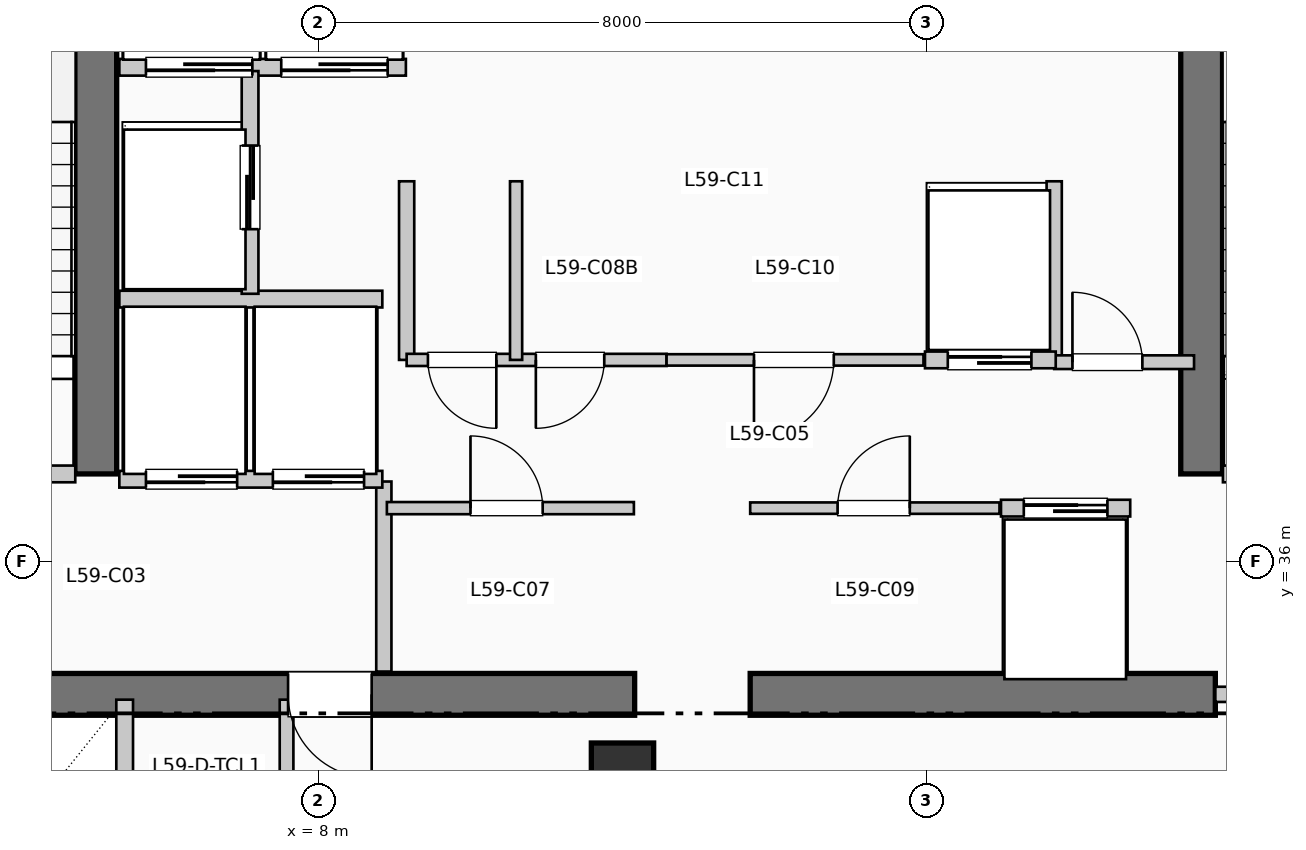
"""IFC4 building model, lengths in metres.
Left out: names, types, materials, properties, quantities, classifications, styles, units other than length and angle.
Written with IfcOpenShell. Run it as: python <this file> out.ifc"""

import sys

from ifc_helpers import new_model, si_unit, direction, frame, frame_2d, origin, origin_2d, place, context, subcontext, project, spatial, rectangle, extrude, element, fill, save


model = new_model("IFC4")
c1 = context("Model", 3, precision=1e-05, world=origin(), true_north=direction((0.0, 1.0)))
c2 = subcontext(c1, "Body", "Model", "MODEL_VIEW")
j1 = project(units=[si_unit("LENGTHUNIT", "METRE"), si_unit("PLANEANGLEUNIT", "RADIAN")], contexts=[c1])
p1 = place(None, origin())
s1 = spatial("IfcSite", under=j1, at=p1, CompositionType="ELEMENT")
p2 = place(p1, origin())
s2 = spatial("IfcBuilding", under=s1, at=p2, CompositionType="ELEMENT")
p3 = place(p2, frame((0.0, 0.0, 243.54)))
s3 = spatial("IfcBuildingStorey", under=s2, at=p3, CompositionType="ELEMENT", Elevation=243.54)
p4 = place(p3, frame((1.45, 34.25, 0.0), z_axis=(0.0, 0.0, 1.0), x_axis=(1.0, 0.0, 0.0)))
e1 = element("IfcWall", 1, at=p4, inside=s3, PredefinedType="SHEAR", context=c2, shape_type="SweptSolid", body=[
    extrude(rectangle(XDim=10.71, YDim=0.55, at=frame_2d((5.355, 0.0))), origin(), (0.0, 0.0, 1.0), 3.96),
])
p5 = place(p4, frame((7.25, 0.0, 0.0), z_axis=(0.0, 0.0, 1.0), x_axis=(-1.0, 0.0, 0.0)))
e2 = element("IfcOpeningElement", 2, at=p5, cuts=e1, PredefinedType="OPENING", context=c2, shape_type="SweptSolid", body=[
    extrude(rectangle(XDim=1.1, YDim=2.15, at=frame_2d((0.55, 1.075))), frame((0.0, 0.285, 0.0), z_axis=(0.0, -1.0, 0.0), x_axis=(1.0, 0.0, 0.0)), (0.0, 0.0, 1.0), 0.57),
])
p6 = place(p3, frame((13.68, 34.25, 0.0), z_axis=(0.0, 0.0, 1.0), x_axis=(1.0, 0.0, 0.0)))
e3 = element("IfcWall", 3, at=p6, inside=s3, PredefinedType="SHEAR", context=c2, shape_type="SweptSolid", body=[
    extrude(rectangle(XDim=6.12, YDim=0.55, at=frame_2d((3.06, 0.0))), origin(), (0.0, 0.0, 1.0), 3.96),
])
for number, where, z_axis, x_axis in (
    (4, (5.07, 37.15, 0.0), (0.0, 0.0, 1.0), (0.0, 1.0, 0.0)),
    (5, (19.62, 37.15, 0.0), (0.0, 0.0, 1.0), (0.0, 1.0, 0.0)),
):
    element("IfcWall", number, at=place(p3, frame(where, z_axis=z_axis, x_axis=x_axis)), inside=s3, PredefinedType="SHEAR", context=c2, shape_type="SweptSolid", body=[
        extrude(rectangle(XDim=7.89, YDim=0.55, at=frame_2d((3.945, 0.0))), origin(), (0.0, 0.0, 1.0), 3.96),
    ])
p7 = place(p3, frame((12.0, 33.2, 0.0), z_axis=(0.0, 0.0, 1.0), x_axis=(1.0, 0.0, 0.0)))
e6 = element("IfcColumn", 6, at=p7, inside=s3, PredefinedType="COLUMN", context=c2, shape_type="SweptSolid", body=[
    extrude(rectangle(XDim=0.82, YDim=0.82, at=origin_2d()), origin(), (0.0, 0.0, 1.0), 3.96),
])
p8 = place(p3, frame((1.65, 37.15, 0.0), z_axis=(0.0, 0.0, 1.0), x_axis=(1.0, 0.0, 0.0)))
e7 = element("IfcWall", 7, at=p8, inside=s3, PredefinedType="PARTITIONING", context=c2, shape_type="SweptSolid", body=[
    extrude(rectangle(XDim=3.15, YDim=0.22, at=frame_2d((1.575, 0.0))), origin(), (0.0, 0.0, 1.0), 3.71),
])
p9 = place(p8, frame((2.05, 0.0, 0.0), z_axis=(0.0, 0.0, 1.0), x_axis=(-1.0, 0.0, 0.0)))
e8 = element("IfcOpeningElement", 8, at=p9, cuts=e7, PredefinedType="OPENING", context=c2, shape_type="SweptSolid", body=[
    extrude(rectangle(XDim=1.05, YDim=2.15, at=frame_2d((0.525, 1.075))), frame((0.0, 0.12, 0.0), z_axis=(0.0, -1.0, 0.0), x_axis=(1.0, 0.0, 0.0)), (0.0, 0.0, 1.0), 0.24),
])
p10 = place(p3, frame((8.86, 34.55, 0.0), z_axis=(0.0, 0.0, 1.0), x_axis=(0.0, 1.0, 0.0)))
e9 = element("IfcWall", 9, at=p10, inside=s3, PredefinedType="PARTITIONING", context=c2, shape_type="SweptSolid", body=[
    extrude(rectangle(XDim=2.5, YDim=0.2, at=frame_2d((1.25, 0.0))), origin(), (0.0, 0.0, 1.0), 3.71),
])
p11 = place(p3, frame((19.9, 37.15, 0.0), z_axis=(0.0, 0.0, 1.0), x_axis=(1.0, 0.0, 0.0)))
e10 = element("IfcWall", 10, at=p11, inside=s3, PredefinedType="PARTITIONING", context=c2, shape_type="SweptSolid", body=[
    extrude(rectangle(XDim=3.15, YDim=0.22, at=frame_2d((1.575, 0.0))), origin(), (0.0, 0.0, 1.0), 3.71),
])
p12 = place(p11, frame((2.05, 0.0, 0.0), z_axis=(0.0, 0.0, 1.0), x_axis=(-1.0, 0.0, 0.0)))
e11 = element("IfcOpeningElement", 11, at=p12, cuts=e10, PredefinedType="OPENING", context=c2, shape_type="SweptSolid", body=[
    extrude(rectangle(XDim=1.05, YDim=2.15, at=frame_2d((0.525, 1.075))), frame((0.0, 0.12, 0.0), z_axis=(0.0, -1.0, 0.0), x_axis=(1.0, 0.0, 0.0)), (0.0, 0.0, 1.0), 0.24),
])
p13 = place(p3, frame((19.8, 34.25, 0.0), z_axis=(0.0, 0.0, 1.0), x_axis=(1.0, 0.0, 0.0)))
e12 = element("IfcWall", 12, at=p13, inside=s3, PredefinedType="PARTITIONING", context=c2, shape_type="SweptSolid", body=[
    extrude(rectangle(XDim=3.25, YDim=0.2, at=frame_2d((1.625, 0.0))), origin(), (0.0, 0.0, 1.0), 3.71),
])
p14 = place(p13, frame((2.15, 0.0, 0.0), z_axis=(0.0, 0.0, 1.0), x_axis=(-1.0, 0.0, 0.0)))
e13 = element("IfcOpeningElement", 13, at=p14, cuts=e12, PredefinedType="OPENING", context=c2, shape_type="SweptSolid", body=[
    extrude(rectangle(XDim=1.1, YDim=2.15, at=frame_2d((0.55, 1.075))), frame((0.0, 0.11, 0.0), z_axis=(0.0, -1.0, 0.0), x_axis=(1.0, 0.0, 0.0)), (0.0, 0.0, 1.0), 0.22),
])
p15 = place(p3, frame((5.38, 37.08, 0.0), z_axis=(0.0, 0.0, 1.0), x_axis=(1.0, 0.0, 0.0)))
e14 = element("IfcWall", 14, at=p15, inside=s3, PredefinedType="PARTITIONING", context=c2, shape_type="SweptSolid", body=[
    extrude(rectangle(XDim=3.46, YDim=0.22, at=frame_2d((1.73, 0.0))), origin(), (0.0, 0.0, 1.0), 3.71),
])
p16 = place(p15, frame((1.55, 0.0, 0.0), z_axis=(0.0, 0.0, 1.0), x_axis=(-1.0, 0.0, 0.0)))
e15 = element("IfcOpeningElement", 15, at=p16, cuts=e14, PredefinedType="OPENING", context=c2, shape_type="SweptSolid", body=[
    extrude(rectangle(XDim=1.2, YDim=2.2, at=frame_2d((0.6, 1.1))), frame((0.0, 0.12, 0.0), z_axis=(0.0, -1.0, 0.0), x_axis=(1.0, 0.0, 0.0)), (0.0, 0.0, 1.0), 0.24),
])
p17 = place(p15, frame((3.22, 0.0, 0.0), z_axis=(0.0, 0.0, 1.0), x_axis=(-1.0, 0.0, 0.0)))
e16 = element("IfcOpeningElement", 16, at=p17, cuts=e14, PredefinedType="OPENING", context=c2, shape_type="SweptSolid", body=[
    extrude(rectangle(XDim=1.2, YDim=2.2, at=frame_2d((0.6, 1.1))), frame((0.0, 0.12, 0.0), z_axis=(0.0, -1.0, 0.0), x_axis=(1.0, 0.0, 0.0)), (0.0, 0.0, 1.0), 0.24),
])
p18 = place(p3, frame((5.38, 39.45, 0.0), z_axis=(0.0, 0.0, 1.0), x_axis=(1.0, 0.0, 0.0)))
e17 = element("IfcWall", 17, at=p18, inside=s3, PredefinedType="PARTITIONING", context=c2, shape_type="SweptSolid", body=[
    extrude(rectangle(XDim=3.46, YDim=0.22, at=frame_2d((1.73, 0.0))), origin(), (0.0, 0.0, 1.0), 3.71),
])
p19 = place(p3, frame((5.38, 42.5, 0.0), z_axis=(0.0, 0.0, 1.0), x_axis=(1.0, 0.0, 0.0)))
e18 = element("IfcWall", 18, at=p19, inside=s3, PredefinedType="PARTITIONING", context=c2, shape_type="SweptSolid", body=[
    extrude(rectangle(XDim=3.77, YDim=0.22, at=frame_2d((1.885, 0.0))), origin(), (0.0, 0.0, 1.0), 3.71),
])
p20 = place(p19, frame((1.75, 0.0, 0.0), z_axis=(0.0, 0.0, 1.0), x_axis=(-1.0, 0.0, 0.0)))
e19 = element("IfcOpeningElement", 19, at=p20, cuts=e18, PredefinedType="OPENING", context=c2, shape_type="SweptSolid", body=[
    extrude(rectangle(XDim=1.4, YDim=2.2, at=frame_2d((0.7, 1.1))), frame((0.0, 0.12, 0.0), z_axis=(0.0, -1.0, 0.0), x_axis=(1.0, 0.0, 0.0)), (0.0, 0.0, 1.0), 0.24),
])
p21 = place(p19, frame((3.53, 0.0, 0.0), z_axis=(0.0, 0.0, 1.0), x_axis=(-1.0, 0.0, 0.0)))
e20 = element("IfcOpeningElement", 20, at=p21, cuts=e18, PredefinedType="OPENING", context=c2, shape_type="SweptSolid", body=[
    extrude(rectangle(XDim=1.4, YDim=2.2, at=frame_2d((0.7, 1.1))), frame((0.0, 0.12, 0.0), z_axis=(0.0, -1.0, 0.0), x_axis=(1.0, 0.0, 0.0)), (0.0, 0.0, 1.0), 0.24),
])
p22 = place(p3, frame((7.1, 39.52, 0.0), z_axis=(0.0, 0.0, 1.0), x_axis=(0.0, 1.0, 0.0)))
e21 = element("IfcWall", 21, at=p22, inside=s3, PredefinedType="PARTITIONING", context=c2, shape_type="SweptSolid", body=[
    extrude(rectangle(XDim=2.93, YDim=0.22, at=frame_2d((1.465, 0.0))), origin(), (0.0, 0.0, 1.0), 3.71),
])
p23 = place(p22, frame((0.85, 0.0, 0.0)))
e22 = element("IfcOpeningElement", 22, at=p23, cuts=e21, PredefinedType="OPENING", context=c2, shape_type="SweptSolid", body=[
    extrude(rectangle(XDim=1.1, YDim=2.2, at=frame_2d((0.55, 1.1))), frame((0.0, 0.12, 0.0), z_axis=(0.0, -1.0, 0.0), x_axis=(1.0, 0.0, 0.0)), (0.0, 0.0, 1.0), 0.24),
])
p24 = place(p3, frame((5.45, 31.8, 0.0), z_axis=(0.0, 0.0, 1.0), x_axis=(0.0, 1.0, 0.0)))
e23 = element("IfcWall", 23, at=p24, inside=s3, PredefinedType="PARTITIONING", context=c2, shape_type="SweptSolid", body=[
    extrude(rectangle(XDim=2.38, YDim=0.22, at=frame_2d((1.19, 0.0))), origin(), (0.0, 0.0, 1.0), 3.71),
])
for number, where, z_axis, x_axis in (
    (24, (9.16, 38.65, 0.0), (0.0, 0.0, 1.0), (0.0, 1.0, 0.0)),
    (25, (17.68, 38.65, 0.0), (0.0, 0.0, 1.0), (0.0, 1.0, 0.0)),
):
    element("IfcWall", number, at=place(p3, frame(where, z_axis=z_axis, x_axis=x_axis)), inside=s3, PredefinedType="PARTITIONING", context=c2, shape_type="SweptSolid", body=[
        extrude(rectangle(XDim=2.35, YDim=0.2, at=frame_2d((1.175, 0.0))), origin(), (0.0, 0.0, 1.0), 3.71),
    ])
p25 = place(p3, frame((17.68, 38.62, 0.0), z_axis=(0.0, 0.0, 1.0), x_axis=(1.0, 0.0, 0.0)))
e26 = element("IfcWall", 26, at=p25, inside=s3, PredefinedType="PARTITIONING", context=c2, shape_type="SweptSolid", body=[
    extrude(rectangle(XDim=1.84, YDim=0.18, at=frame_2d((0.92, 0.0))), origin(), (0.0, 0.0, 1.0), 3.71),
])
p26 = place(p25, frame((0.24, 0.0, 0.0)))
e27 = element("IfcOpeningElement", 27, at=p26, cuts=e26, PredefinedType="OPENING", context=c2, shape_type="SweptSolid", body=[
    extrude(rectangle(XDim=0.92, YDim=2.1, at=frame_2d((0.46, 1.05))), frame((0.0, 0.1, 0.0), z_axis=(0.0, -1.0, 0.0), x_axis=(1.0, 0.0, 0.0)), (0.0, 0.0, 1.0), 0.2),
])
p27 = place(p3, frame((7.58, 31.82, 0.0), z_axis=(0.0, 0.0, 1.0), x_axis=(0.0, 1.0, 0.0)))
e28 = element("IfcWall", 28, at=p27, inside=s3, PredefinedType="PLUMBINGWALL", context=c2, shape_type="SweptSolid", body=[
    extrude(rectangle(XDim=2.36, YDim=0.18, at=frame_2d((1.18, 0.0))), origin(), (0.0, 0.0, 1.0), 3.71),
])
p28 = place(p3, frame((8.9, 36.7, 0.0), z_axis=(0.0, 0.0, 1.0), x_axis=(1.0, 0.0, 0.0)))
e29 = element("IfcWall", 29, at=p28, inside=s3, PredefinedType="PARTITIONING", context=c2, shape_type="SweptSolid", body=[
    extrude(rectangle(XDim=3.25, YDim=0.16, at=frame_2d((1.625, 0.0))), origin(), (0.0, 0.0, 1.0), 3.71),
])
p29 = place(p28, frame((1.1, 0.0, 0.0)))
e30 = element("IfcOpeningElement", 30, at=p29, cuts=e29, PredefinedType="OPENING", context=c2, shape_type="SweptSolid", body=[
    extrude(rectangle(XDim=0.95, YDim=2.15, at=frame_2d((0.475, 1.075))), frame((0.0, 0.09, 0.0), z_axis=(0.0, -1.0, 0.0), x_axis=(1.0, 0.0, 0.0)), (0.0, 0.0, 1.0), 0.18),
])
p30 = place(p3, frame((9.16, 38.65, 0.0), z_axis=(0.0, 0.0, 1.0), x_axis=(1.0, 0.0, 0.0)))
e31 = element("IfcWall", 31, at=p30, inside=s3, PredefinedType="PARTITIONING", context=c2, shape_type="SweptSolid", body=[
    extrude(rectangle(XDim=3.42, YDim=0.16, at=frame_2d((1.71, 0.0))), origin(), (0.0, 0.0, 1.0), 3.71),
])
p31 = place(p30, frame((1.18, 0.0, 0.0), z_axis=(0.0, 0.0, 1.0), x_axis=(-1.0, 0.0, 0.0)))
e32 = element("IfcOpeningElement", 32, at=p31, cuts=e31, PredefinedType="OPENING", context=c2, shape_type="SweptSolid", body=[
    extrude(rectangle(XDim=0.9, YDim=2.15, at=frame_2d((0.45, 1.075))), frame((0.0, 0.09, 0.0), z_axis=(0.0, -1.0, 0.0), x_axis=(1.0, 0.0, 0.0)), (0.0, 0.0, 1.0), 0.18),
])
p32 = place(p30, frame((2.6, 0.0, 0.0), z_axis=(0.0, 0.0, 1.0), x_axis=(-1.0, 0.0, 0.0)))
e33 = element("IfcOpeningElement", 33, at=p32, cuts=e31, PredefinedType="OPENING", context=c2, shape_type="SweptSolid", body=[
    extrude(rectangle(XDim=0.9, YDim=2.15, at=frame_2d((0.45, 1.075))), frame((0.0, 0.09, 0.0), z_axis=(0.0, -1.0, 0.0), x_axis=(1.0, 0.0, 0.0)), (0.0, 0.0, 1.0), 0.18),
])
p33 = place(p3, frame((10.6, 38.65, 0.0), z_axis=(0.0, 0.0, 1.0), x_axis=(0.0, 1.0, 0.0)))
e34 = element("IfcWall", 34, at=p33, inside=s3, PredefinedType="PARTITIONING", context=c2, shape_type="SweptSolid", body=[
    extrude(rectangle(XDim=2.35, YDim=0.16, at=frame_2d((1.175, 0.0))), origin(), (0.0, 0.0, 1.0), 3.71),
])
p34 = place(p3, frame((13.68, 36.7, 0.0), z_axis=(0.0, 0.0, 1.0), x_axis=(1.0, 0.0, 0.0)))
e35 = element("IfcWall", 35, at=p34, inside=s3, PredefinedType="PARTITIONING", context=c2, shape_type="SweptSolid", body=[
    extrude(rectangle(XDim=3.28, YDim=0.15, at=frame_2d((1.64, 0.0))), origin(), (0.0, 0.0, 1.0), 3.71),
])
p35 = place(p34, frame((1.15, 0.0, 0.0)))
e36 = element("IfcOpeningElement", 36, at=p35, cuts=e35, PredefinedType="OPENING", context=c2, shape_type="SweptSolid", body=[
    extrude(rectangle(XDim=0.95, YDim=2.15, at=frame_2d((0.475, 1.075))), frame((0.0, 0.085, 0.0), z_axis=(0.0, -1.0, 0.0), x_axis=(1.0, 0.0, 0.0)), (0.0, 0.0, 1.0), 0.17),
])
p36 = place(p3, frame((12.58, 38.65, 0.0), z_axis=(0.0, 0.0, 1.0), x_axis=(1.0, 0.0, 0.0)))
e37 = element("IfcWall", 37, at=p36, inside=s3, PredefinedType="PARTITIONING", context=c2, shape_type="SweptSolid", body=[
    extrude(rectangle(XDim=3.38, YDim=0.15, at=frame_2d((1.69, 0.0))), origin(), (0.0, 0.0, 1.0), 3.71),
])
p37 = place(p36, frame((2.2, 0.0, 0.0), z_axis=(0.0, 0.0, 1.0), x_axis=(-1.0, 0.0, 0.0)))
e38 = element("IfcOpeningElement", 38, at=p37, cuts=e37, PredefinedType="OPENING", context=c2, shape_type="SweptSolid", body=[
    extrude(rectangle(XDim=1.05, YDim=2.15, at=frame_2d((0.525, 1.075))), frame((0.0, 0.085, 0.0), z_axis=(0.0, -1.0, 0.0), x_axis=(1.0, 0.0, 0.0)), (0.0, 0.0, 1.0), 0.17),
])
p38 = place(p3, frame((16.98, 36.7, 0.0), z_axis=(0.0, 0.0, 1.0), x_axis=(1.0, 0.0, 0.0)))
e39 = element("IfcWall", 39, at=p38, inside=s3, PredefinedType="PARTITIONING", context=c2, shape_type="SweptSolid", body=[
    extrude(rectangle(XDim=1.7, YDim=0.22, at=frame_2d((0.85, 0.0))), origin(), (0.0, 0.0, 1.0), 3.71),
])
p39 = place(p38, frame((0.3, 0.0, 0.0)))
e40 = element("IfcOpeningElement", 40, at=p39, cuts=e39, PredefinedType="OPENING", context=c2, shape_type="SweptSolid", body=[
    extrude(rectangle(XDim=1.1, YDim=2.2, at=frame_2d((0.55, 1.1))), frame((0.0, 0.12, 0.0), z_axis=(0.0, -1.0, 0.0), x_axis=(1.0, 0.0, 0.0)), (0.0, 0.0, 1.0), 0.24),
])
p40 = place(p3, frame((15.98, 38.65, 0.0), z_axis=(0.0, 0.0, 1.0), x_axis=(1.0, 0.0, 0.0)))
e41 = element("IfcWall", 41, at=p40, inside=s3, PredefinedType="PARTITIONING", context=c2, shape_type="SweptSolid", body=[
    extrude(rectangle(XDim=1.72, YDim=0.22, at=frame_2d((0.86, 0.0))), origin(), (0.0, 0.0, 1.0), 3.71),
])
p41 = place(p40, frame((0.3, 0.0, 0.0)))
e42 = element("IfcOpeningElement", 42, at=p41, cuts=e41, PredefinedType="OPENING", context=c2, shape_type="SweptSolid", body=[
    extrude(rectangle(XDim=1.1, YDim=2.2, at=frame_2d((0.55, 1.1))), frame((0.0, 0.12, 0.0), z_axis=(0.0, -1.0, 0.0), x_axis=(1.0, 0.0, 0.0)), (0.0, 0.0, 1.0), 0.24),
])
p42 = place(p5, origin())
e43 = element("IfcDoor", 43, at=p42, inside=s3, OperationType="SINGLE_SWING_RIGHT", PredefinedType="DOOR", context=c2, shape_type="SweptSolid", body=[
    extrude(rectangle(XDim=1.1, YDim=2.15, at=frame_2d((0.55, 1.075))), frame((0.0, 0.025, 0.0), z_axis=(0.0, -1.0, 0.0), x_axis=(1.0, 0.0, 0.0)), (0.0, 0.0, 1.0), 0.05),
])
fill(e2, e43)
p43 = place(p16, origin())
e44 = element("IfcDoor", 44, at=p43, inside=s3, OperationType="SLIDING_TO_RIGHT", PredefinedType="DOOR", context=c2, shape_type="SweptSolid", body=[
    extrude(rectangle(XDim=1.2, YDim=2.2, at=frame_2d((0.6, 1.1))), frame((0.0, 0.025, 0.0), z_axis=(0.0, -1.0, 0.0), x_axis=(1.0, 0.0, 0.0)), (0.0, 0.0, 1.0), 0.05),
])
fill(e15, e44)
p44 = place(p17, origin())
e45 = element("IfcDoor", 45, at=p44, inside=s3, OperationType="SLIDING_TO_RIGHT", PredefinedType="DOOR", context=c2, shape_type="SweptSolid", body=[
    extrude(rectangle(XDim=1.2, YDim=2.2, at=frame_2d((0.6, 1.1))), frame((0.0, 0.025, 0.0), z_axis=(0.0, -1.0, 0.0), x_axis=(1.0, 0.0, 0.0)), (0.0, 0.0, 1.0), 0.05),
])
fill(e16, e45)
p45 = place(p20, origin())
e46 = element("IfcDoor", 46, at=p45, inside=s3, OperationType="SLIDING_TO_LEFT", PredefinedType="DOOR", context=c2, shape_type="SweptSolid", body=[
    extrude(rectangle(XDim=1.4, YDim=2.2, at=frame_2d((0.7, 1.1))), frame((0.0, 0.025, 0.0), z_axis=(0.0, -1.0, 0.0), x_axis=(1.0, 0.0, 0.0)), (0.0, 0.0, 1.0), 0.05),
])
fill(e19, e46)
p46 = place(p21, origin())
e47 = element("IfcDoor", 47, at=p46, inside=s3, OperationType="SLIDING_TO_LEFT", PredefinedType="DOOR", context=c2, shape_type="SweptSolid", body=[
    extrude(rectangle(XDim=1.4, YDim=2.2, at=frame_2d((0.7, 1.1))), frame((0.0, 0.025, 0.0), z_axis=(0.0, -1.0, 0.0), x_axis=(1.0, 0.0, 0.0)), (0.0, 0.0, 1.0), 0.05),
])
fill(e20, e47)
p47 = place(p23, origin())
e48 = element("IfcDoor", 48, at=p47, inside=s3, OperationType="SLIDING_TO_LEFT", PredefinedType="DOOR", context=c2, shape_type="SweptSolid", body=[
    extrude(rectangle(XDim=1.1, YDim=2.2, at=frame_2d((0.55, 1.1))), frame((0.0, 0.025, 0.0), z_axis=(0.0, -1.0, 0.0), x_axis=(1.0, 0.0, 0.0)), (0.0, 0.0, 1.0), 0.05),
])
fill(e22, e48)
p48 = place(p26, origin())
e49 = element("IfcDoor", 49, at=p48, inside=s3, OperationType="SINGLE_SWING_LEFT", PredefinedType="DOOR", context=c2, shape_type="SweptSolid", body=[
    extrude(rectangle(XDim=0.92, YDim=2.1, at=frame_2d((0.46, 1.05))), frame((0.0, 0.025, 0.0), z_axis=(0.0, -1.0, 0.0), x_axis=(1.0, 0.0, 0.0)), (0.0, 0.0, 1.0), 0.05),
])
fill(e27, e49)
p49 = place(p29, origin())
e50 = element("IfcDoor", 50, at=p49, inside=s3, OperationType="SINGLE_SWING_LEFT", PredefinedType="DOOR", context=c2, shape_type="SweptSolid", body=[
    extrude(rectangle(XDim=0.95, YDim=2.15, at=frame_2d((0.475, 1.075))), frame((0.0, 0.025, 0.0), z_axis=(0.0, -1.0, 0.0), x_axis=(1.0, 0.0, 0.0)), (0.0, 0.0, 1.0), 0.05),
])
fill(e30, e50)
p50 = place(p31, origin())
e51 = element("IfcDoor", 51, at=p50, inside=s3, OperationType="SINGLE_SWING_RIGHT", PredefinedType="DOOR", context=c2, shape_type="SweptSolid", body=[
    extrude(rectangle(XDim=0.9, YDim=2.15, at=frame_2d((0.45, 1.075))), frame((0.0, 0.025, 0.0), z_axis=(0.0, -1.0, 0.0), x_axis=(1.0, 0.0, 0.0)), (0.0, 0.0, 1.0), 0.05),
])
fill(e32, e51)
p51 = place(p32, origin())
e52 = element("IfcDoor", 52, at=p51, inside=s3, OperationType="SINGLE_SWING_LEFT", PredefinedType="DOOR", context=c2, shape_type="SweptSolid", body=[
    extrude(rectangle(XDim=0.9, YDim=2.15, at=frame_2d((0.45, 1.075))), frame((0.0, 0.025, 0.0), z_axis=(0.0, -1.0, 0.0), x_axis=(1.0, 0.0, 0.0)), (0.0, 0.0, 1.0), 0.05),
])
fill(e33, e52)
p52 = place(p35, origin())
e53 = element("IfcDoor", 53, at=p52, inside=s3, OperationType="SINGLE_SWING_RIGHT", PredefinedType="DOOR", context=c2, shape_type="SweptSolid", body=[
    extrude(rectangle(XDim=0.95, YDim=2.15, at=frame_2d((0.475, 1.075))), frame((0.0, 0.025, 0.0), z_axis=(0.0, -1.0, 0.0), x_axis=(1.0, 0.0, 0.0)), (0.0, 0.0, 1.0), 0.05),
])
fill(e36, e53)
p53 = place(p37, origin())
e54 = element("IfcDoor", 54, at=p53, inside=s3, OperationType="SINGLE_SWING_LEFT", PredefinedType="DOOR", context=c2, shape_type="SweptSolid", body=[
    extrude(rectangle(XDim=1.05, YDim=2.15, at=frame_2d((0.525, 1.075))), frame((0.0, 0.025, 0.0), z_axis=(0.0, -1.0, 0.0), x_axis=(1.0, 0.0, 0.0)), (0.0, 0.0, 1.0), 0.05),
])
fill(e38, e54)
p54 = place(p39, origin())
e55 = element("IfcDoor", 55, at=p54, inside=s3, OperationType="SLIDING_TO_LEFT", PredefinedType="DOOR", context=c2, shape_type="SweptSolid", body=[
    extrude(rectangle(XDim=1.1, YDim=2.2, at=frame_2d((0.55, 1.1))), frame((0.0, 0.025, 0.0), z_axis=(0.0, -1.0, 0.0), x_axis=(1.0, 0.0, 0.0)), (0.0, 0.0, 1.0), 0.05),
])
fill(e40, e55)
p55 = place(p41, origin())
e56 = element("IfcDoor", 56, at=p55, inside=s3, OperationType="SLIDING_TO_LEFT", PredefinedType="DOOR", context=c2, shape_type="SweptSolid", body=[
    extrude(rectangle(XDim=1.1, YDim=2.2, at=frame_2d((0.55, 1.1))), frame((0.0, 0.025, 0.0), z_axis=(0.0, -1.0, 0.0), x_axis=(1.0, 0.0, 0.0)), (0.0, 0.0, 1.0), 0.05),
])
fill(e42, e56)
save(model, sys.argv[1])
